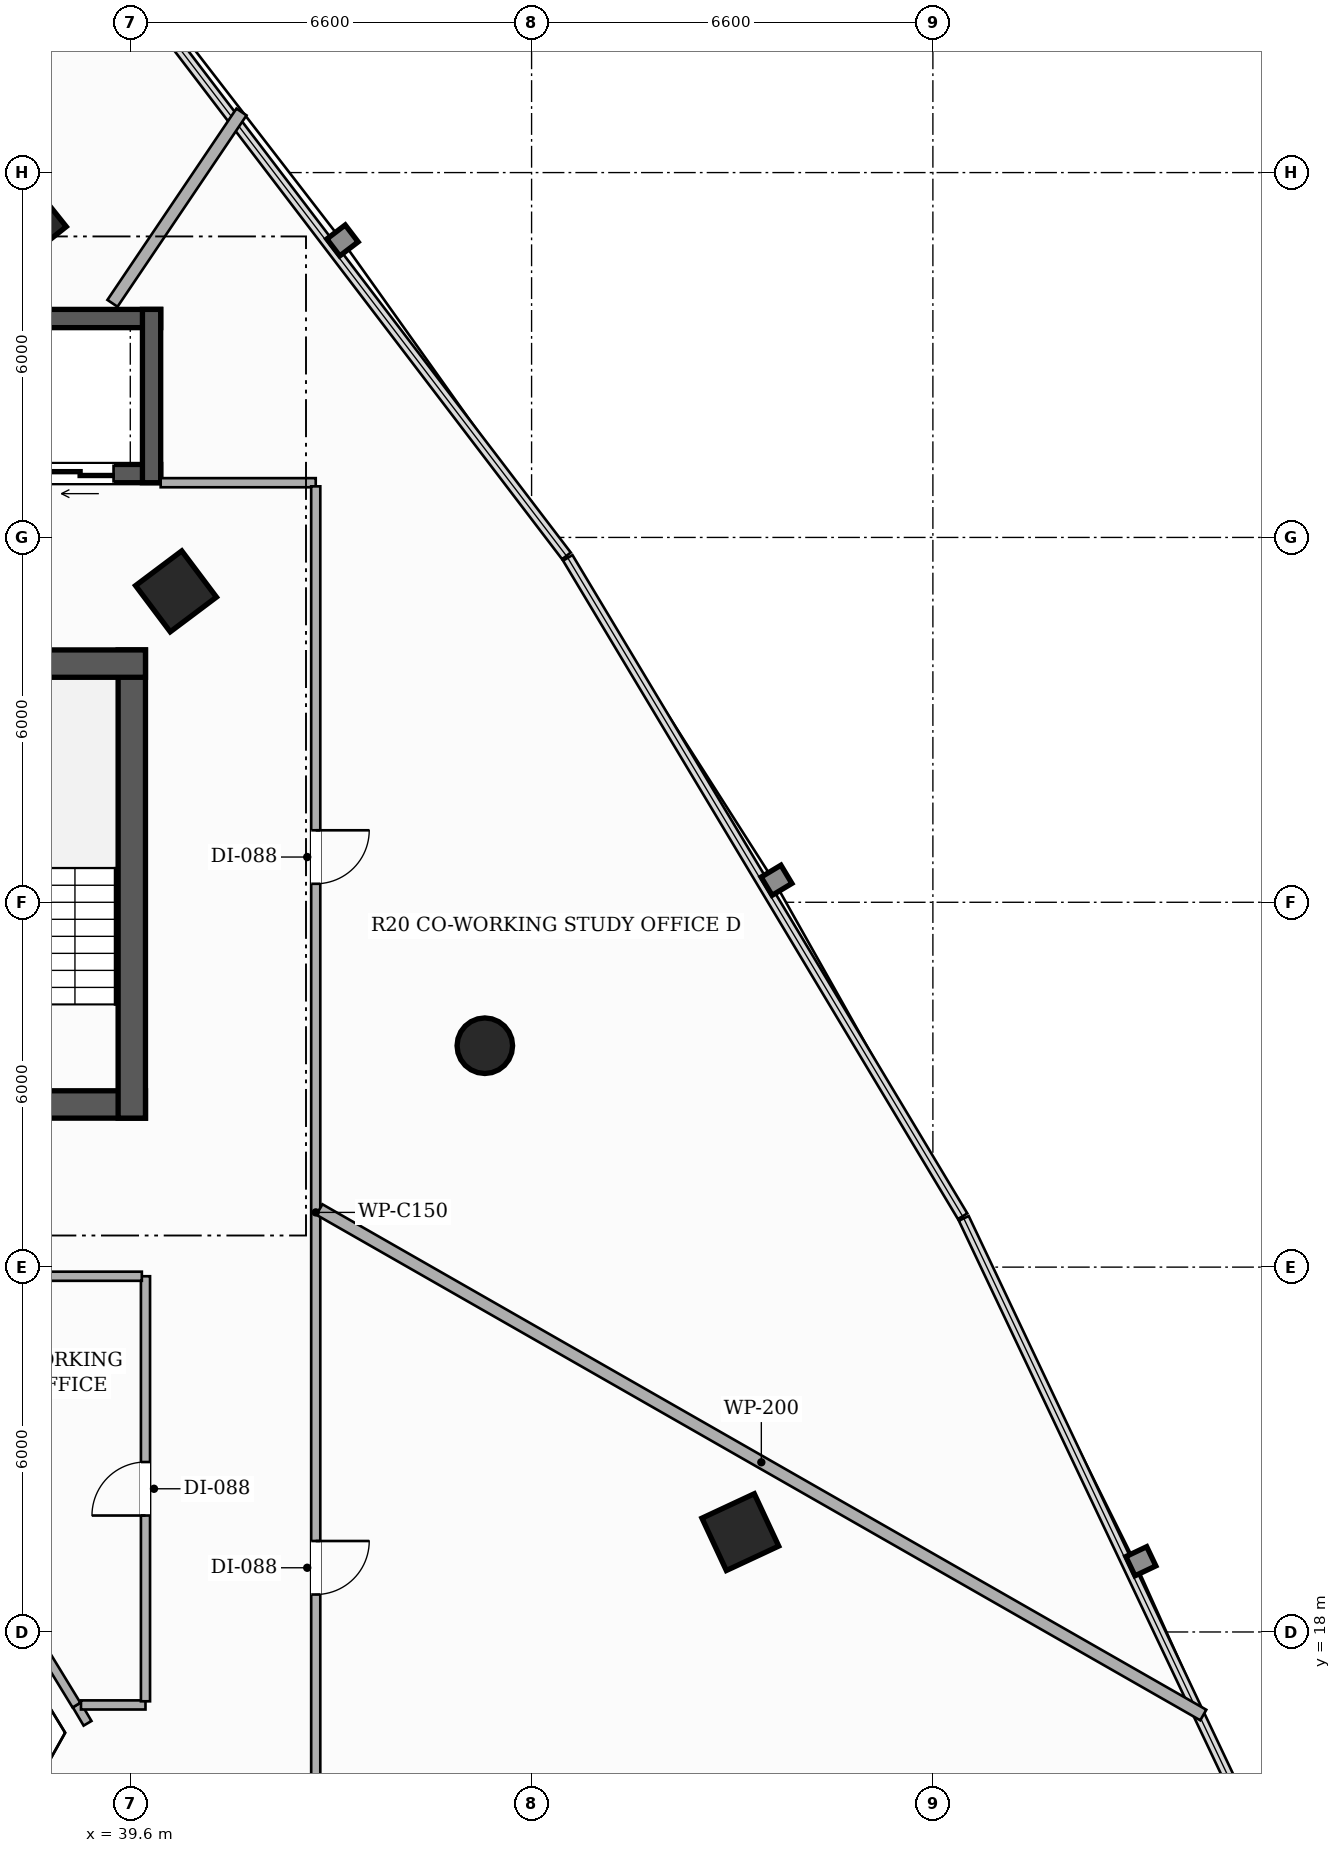
"""IFC4 building model, lengths in metres.
Left out: names, types, materials, properties, quantities, classifications, styles, units other than length and angle.
Written with IfcOpenShell. Run it as: python <this file> out.ifc"""

import sys

from ifc_helpers import new_model, si_unit, direction, frame, frame_2d, origin, origin_2d, place, context, subcontext, project, spatial, rectangle, hollow_rectangle, hollow_circle, extrude, element, fill, save


model = new_model("IFC4")
c1 = context("Model", 3, precision=1e-05, world=origin(), true_north=direction((0.0, 1.0)))
c2 = subcontext(c1, "Body", "Model", "MODEL_VIEW")
j1 = project(units=[si_unit("LENGTHUNIT", "METRE"), si_unit("PLANEANGLEUNIT", "RADIAN")], contexts=[c1])
p1 = place(None, origin())
s1 = spatial("IfcSite", under=j1, at=p1, CompositionType="ELEMENT")
p2 = place(p1, origin())
s2 = spatial("IfcBuilding", under=s1, at=p2, CompositionType="ELEMENT")
p3 = place(p2, frame((0.0, 0.0, 53.3)))
s3 = spatial("IfcBuildingStorey", under=s2, at=p3, CompositionType="ELEMENT", Elevation=53.3)
p4 = place(p3, frame((26.15, 26.675, 0.0), z_axis=(0.0, 0.0, 1.0), x_axis=(1.0, 0.0, 0.0)))
e1 = element("IfcWall", 1, at=p4, inside=s3, PredefinedType="SHEAR", context=c2, shape_type="SweptSolid", body=[
    extrude(rectangle(XDim=13.7, YDim=0.45, at=frame_2d((6.85, 0.0))), origin(), (0.0, 0.0, 1.0), 3.3),
])
p5 = place(p4, frame((4.35, 0.0, 0.0)))
e2 = element("IfcOpeningElement", 2, at=p5, cuts=e1, PredefinedType="OPENING", context=c2, shape_type="SweptSolid", body=[
    extrude(rectangle(XDim=1.05, YDim=2.15, at=frame_2d((0.525, 1.075))), frame((0.0, 0.235, 0.0), z_axis=(0.0, -1.0, 0.0), x_axis=(1.0, 0.0, 0.0)), (0.0, 0.0, 1.0), 0.47),
])
p6 = place(p4, frame((8.3, 0.0, 0.0)))
e3 = element("IfcOpeningElement", 3, at=p6, cuts=e1, PredefinedType="OPENING", context=c2, shape_type="SweptSolid", body=[
    extrude(rectangle(XDim=1.05, YDim=2.15, at=frame_2d((0.525, 1.075))), frame((0.0, 0.235, 0.0), z_axis=(0.0, -1.0, 0.0), x_axis=(1.0, 0.0, 0.0)), (0.0, 0.0, 1.0), 0.47),
])
p7 = place(p3, frame((39.625, 26.45, 0.0), z_axis=(0.0, 0.0, 1.0), x_axis=(0.0, 1.0, 0.0)))
e4 = element("IfcWall", 4, at=p7, inside=s3, PredefinedType="SHEAR", context=c2, shape_type="SweptSolid", body=[
    extrude(rectangle(XDim=7.7, YDim=0.45, at=frame_2d((3.85, 0.0))), origin(), (0.0, 0.0, 1.0), 3.3),
])
p8 = place(p3, frame((36.1, 33.925, 0.0), z_axis=(0.0, 0.0, 1.0), x_axis=(1.0, 0.0, 0.0)))
e5 = element("IfcWall", 5, at=p8, inside=s3, PredefinedType="SHEAR", context=c2, shape_type="SweptSolid", body=[
    extrude(rectangle(XDim=3.75, YDim=0.45, at=frame_2d((1.875, 0.0))), origin(), (0.0, 0.0, 1.0), 3.3),
])
p9 = place(p3, frame((40.1, 37.05, 0.0), z_axis=(0.0, 0.0, 1.0), x_axis=(-1.0, 0.0, 0.0)))
e6 = element("IfcWall", 6, at=p9, inside=s3, PredefinedType="SHEAR", context=c2, shape_type="SweptSolid", body=[
    extrude(rectangle(XDim=14.2, YDim=0.3, at=frame_2d((7.1, 0.0))), origin(), (0.0, 0.0, 1.0), 3.3),
])
p10 = place(p9, frame((12.325, 0.0, 0.0)))
e7 = element("IfcOpeningElement", 7, at=p10, cuts=e6, PredefinedType="OPENING", context=c2, shape_type="SweptSolid", body=[
    extrude(rectangle(XDim=1.1, YDim=2.2, at=frame_2d((0.55, 1.1))), frame((0.0, 0.16, 0.0), z_axis=(0.0, -1.0, 0.0), x_axis=(1.0, 0.0, 0.0)), (0.0, 0.0, 1.0), 0.32),
])
p11 = place(p9, frame((0.775, 0.0, 0.0)))
e8 = element("IfcOpeningElement", 8, at=p11, cuts=e6, PredefinedType="OPENING", context=c2, shape_type="SweptSolid", body=[
    extrude(rectangle(XDim=1.1, YDim=2.2, at=frame_2d((0.55, 1.1))), frame((0.0, 0.16, 0.0), z_axis=(0.0, -1.0, 0.0), x_axis=(1.0, 0.0, 0.0)), (0.0, 0.0, 1.0), 0.32),
])
p12 = place(p3, frame((25.9, 39.6, 0.0), z_axis=(0.0, 0.0, 1.0), x_axis=(1.0, 0.0, 0.0)))
e9 = element("IfcWall", 9, at=p12, inside=s3, PredefinedType="SHEAR", context=c2, shape_type="SweptSolid", body=[
    extrude(rectangle(XDim=14.2, YDim=0.3, at=frame_2d((7.1, 0.0))), origin(), (0.0, 0.0, 1.0), 3.3),
])
p13 = place(p3, frame((39.95, 36.9, 0.0), z_axis=(0.0, 0.0, 1.0), x_axis=(0.0, 1.0, 0.0)))
e10 = element("IfcWall", 10, at=p13, inside=s3, PredefinedType="SHEAR", context=c2, shape_type="SweptSolid", body=[
    extrude(rectangle(XDim=2.85, YDim=0.3, at=frame_2d((1.425, 0.0))), origin(), (0.0, 0.0, 1.0), 3.3),
])
p14 = place(p3, frame((49.633, 19.642, 0.0), z_axis=(0.0, 0.0, 1.0), x_axis=(-0.422618261741, 0.906307787037, 0.0)))
e11 = element("IfcColumn", 11, at=p14, inside=s3, PredefinedType="COLUMN", context=c2, shape_type="SweptSolid", body=[
    extrude(hollow_rectangle(XDim=0.95, YDim=0.95, WallThickness=0.032, at=origin_2d()), origin(), (0.0, 0.0, 1.0), 3.3),
])
p15 = place(p3, frame((45.431, 27.641, 0.0), z_axis=(0.0, 0.0, 1.0), x_axis=(1.0, 0.0, 0.0)))
e12 = element("IfcColumn", 12, at=p15, inside=s3, PredefinedType="COLUMN", context=c2, shape_type="SweptSolid", body=[
    extrude(hollow_circle(Radius=0.457, WallThickness=0.025, at=origin_2d()), origin(), (0.0, 0.0, 1.0), 3.3),
])
p16 = place(p3, frame((40.352, 35.113, 0.0), z_axis=(0.0, 0.0, 1.0), x_axis=(-0.600420225326, 0.799684658487, 0.0)))
e13 = element("IfcColumn", 13, at=p16, inside=s3, PredefinedType="COLUMN", context=c2, shape_type="SweptSolid", body=[
    extrude(hollow_rectangle(XDim=0.95, YDim=0.95, WallThickness=0.032, at=origin_2d()), origin(), (0.0, 0.0, 1.0), 3.3),
])
p17 = place(p3, frame((37.95, 41.178, 0.0), z_axis=(0.0, 0.0, 1.0), x_axis=(-0.623879596709, 0.781520472419, 0.0)))
e14 = element("IfcColumn", 14, at=p17, inside=s3, PredefinedType="COLUMN", context=c2, shape_type="SweptSolid", body=[
    extrude(hollow_rectangle(XDim=0.85, YDim=0.85, WallThickness=0.028, at=origin_2d()), origin(), (0.0, 0.0, 1.0), 3.3),
])
p18 = place(p3, frame((40.1, 36.9, 0.0), z_axis=(0.0, 0.0, 1.0), x_axis=(1.0, 0.0, 0.0)))
e15 = element("IfcWall", 15, at=p18, inside=s3, PredefinedType="PARTITIONING", context=c2, shape_type="SweptSolid", body=[
    extrude(rectangle(XDim=2.55, YDim=0.15, at=frame_2d((1.275, 0.0))), origin(), (0.0, 0.0, 1.0), 2.413),
])
p19 = place(p3, frame((42.65, 36.84, 0.0), z_axis=(0.0, 0.0, 1.0), x_axis=(0.0, -1.0, 0.0)))
e16 = element("IfcWall", 16, at=p19, inside=s3, PredefinedType="PARTITIONING", context=c2, shape_type="SweptSolid", body=[
    extrude(rectangle(XDim=25.04, YDim=0.15, at=frame_2d((12.52, 0.0))), origin(), (0.0, 0.0, 1.0), 2.413),
])
p20 = place(p19, frame((17.344, 0.0, 0.0)))
e17 = element("IfcOpeningElement", 17, at=p20, cuts=e16, PredefinedType="OPENING", context=c2, shape_type="SweptSolid", body=[
    extrude(rectangle(XDim=0.88, YDim=2.1, at=frame_2d((0.44, 1.05))), frame((0.0, 0.085, 0.0), z_axis=(0.0, -1.0, 0.0), x_axis=(1.0, 0.0, 0.0)), (0.0, 0.0, 1.0), 0.17),
])
p21 = place(p19, frame((5.656, 0.0, 0.0)))
e18 = element("IfcOpeningElement", 18, at=p21, cuts=e16, PredefinedType="OPENING", context=c2, shape_type="SweptSolid", body=[
    extrude(rectangle(XDim=0.88, YDim=2.1, at=frame_2d((0.44, 1.05))), frame((0.0, 0.085, 0.0), z_axis=(0.0, -1.0, 0.0), x_axis=(1.0, 0.0, 0.0)), (0.0, 0.0, 1.0), 0.17),
])
p22 = place(p3, frame((38.897, 16.498, 0.0), z_axis=(0.0, 0.0, 1.0), x_axis=(-0.507720001023, 0.861522141654, 0.0)))
e19 = element("IfcWall", 19, at=p22, inside=s3, PredefinedType="PARTITIONING", context=c2, shape_type="SweptSolid", body=[
    extrude(rectangle(XDim=0.351, YDim=0.15, at=frame_2d((0.175, 0.0))), origin(), (0.0, 0.0, 1.0), 3.06),
])
p23 = place(p3, frame((38.789, 16.8, 0.0), z_axis=(0.0, 0.0, 1.0), x_axis=(1.0, 0.0, 0.0)))
e20 = element("IfcWall", 20, at=p23, inside=s3, PredefinedType="PARTITIONING", context=c2, shape_type="SweptSolid", body=[
    extrude(rectangle(XDim=1.061, YDim=0.15, at=frame_2d((0.531, 0.0))), origin(), (0.0, 0.0, 1.0), 3.06),
])
p24 = place(p3, frame((39.85, 16.86, 0.0), z_axis=(0.0, 0.0, 1.0), x_axis=(0.0, 1.0, 0.0)))
e21 = element("IfcWall", 21, at=p24, inside=s3, PredefinedType="PARTITIONING", context=c2, shape_type="SweptSolid", body=[
    extrude(rectangle(XDim=6.99, YDim=0.15, at=frame_2d((3.495, 0.0))), origin(), (0.0, 0.0, 1.0), 2.669),
])
p25 = place(p24, frame((3.055, 0.0, 0.0)))
e22 = element("IfcOpeningElement", 22, at=p25, cuts=e21, PredefinedType="OPENING", context=c2, shape_type="SweptSolid", body=[
    extrude(rectangle(XDim=0.88, YDim=2.1, at=frame_2d((0.44, 1.05))), frame((0.0, 0.085, 0.0), z_axis=(0.0, -1.0, 0.0), x_axis=(1.0, 0.0, 0.0)), (0.0, 0.0, 1.0), 0.17),
])
p26 = place(p3, frame((39.79, 23.85, 0.0), z_axis=(0.0, 0.0, 1.0), x_axis=(-1.0, 0.0, 0.0)))
e23 = element("IfcWall", 23, at=p26, inside=s3, PredefinedType="PARTITIONING", context=c2, shape_type="SweptSolid", body=[
    extrude(rectangle(XDim=5.381, YDim=0.15, at=frame_2d((2.69, 0.0))), origin(), (0.0, 0.0, 1.0), 2.669),
])
p27 = place(p3, frame((34.445, 23.79, 0.0), z_axis=(0.0, 0.0, 1.0), x_axis=(0.521145044988, -0.853468125992, 0.0)))
e24 = element("IfcWall", 24, at=p27, inside=s3, PredefinedType="PARTITIONING", context=c2, shape_type="SweptSolid", body=[
    extrude(rectangle(XDim=8.194, YDim=0.15, at=frame_2d((4.097, 0.0))), origin(), (0.0, 0.0, 1.0), 2.669),
])
p28 = place(p3, frame((42.71, 24.947, 0.0), z_axis=(0.0, 0.0, 1.0), x_axis=(0.868086992596, -0.49641210026, 0.0)))
e25 = element("IfcWall", 25, at=p28, inside=s3, PredefinedType="PARTITIONING", context=c2, shape_type="SweptSolid", body=[
    extrude(rectangle(XDim=16.746, YDim=0.2, at=frame_2d((8.373, 0.0))), origin(), (0.0, 0.0, 1.0), 2.413),
])
p29 = place(p3, frame((41.429, 42.997, 0.0), z_axis=(0.0, 0.0, 1.0), x_axis=(-0.559086144532, -0.829109572368, 0.0)))
e26 = element("IfcWall", 26, at=p29, inside=s3, PredefinedType="PARTITIONING", context=c2, shape_type="SweptSolid", body=[
    extrude(rectangle(XDim=3.796, YDim=0.2, at=frame_2d((1.898, 0.0))), origin(), (0.0, 0.0, 1.0), 3.06),
])
p30 = place(p11, origin())
e27 = element("IfcDoor", 27, at=p30, inside=s3, OperationType="DOUBLE_DOOR_SLIDING", PredefinedType="DOOR", context=c2, shape_type="SweptSolid", body=[
    extrude(rectangle(XDim=1.1, YDim=2.2, at=frame_2d((0.55, 1.1))), frame((0.0, 0.025, 0.0), z_axis=(0.0, -1.0, 0.0), x_axis=(1.0, 0.0, 0.0)), (0.0, 0.0, 1.0), 0.05),
])
fill(e8, e27)
p31 = place(p20, origin())
e28 = element("IfcDoor", 28, at=p31, inside=s3, OperationType="SINGLE_SWING_LEFT", PredefinedType="DOOR", context=c2, shape_type="SweptSolid", body=[
    extrude(rectangle(XDim=0.88, YDim=2.1, at=frame_2d((0.44, 1.05))), frame((0.0, 0.025, 0.0), z_axis=(0.0, -1.0, 0.0), x_axis=(1.0, 0.0, 0.0)), (0.0, 0.0, 1.0), 0.05),
])
fill(e17, e28)
p32 = place(p21, origin())
e29 = element("IfcDoor", 29, at=p32, inside=s3, OperationType="SINGLE_SWING_LEFT", PredefinedType="DOOR", context=c2, shape_type="SweptSolid", body=[
    extrude(rectangle(XDim=0.88, YDim=2.1, at=frame_2d((0.44, 1.05))), frame((0.0, 0.025, 0.0), z_axis=(0.0, -1.0, 0.0), x_axis=(1.0, 0.0, 0.0)), (0.0, 0.0, 1.0), 0.05),
])
fill(e18, e29)
p33 = place(p25, origin())
e30 = element("IfcDoor", 30, at=p33, inside=s3, OperationType="SINGLE_SWING_LEFT", PredefinedType="DOOR", context=c2, shape_type="SweptSolid", body=[
    extrude(rectangle(XDim=0.88, YDim=2.1, at=frame_2d((0.44, 1.05))), frame((0.0, 0.025, 0.0), z_axis=(0.0, -1.0, 0.0), x_axis=(1.0, 0.0, 0.0)), (0.0, 0.0, 1.0), 0.05),
])
fill(e22, e30)
save(model, sys.argv[1])
